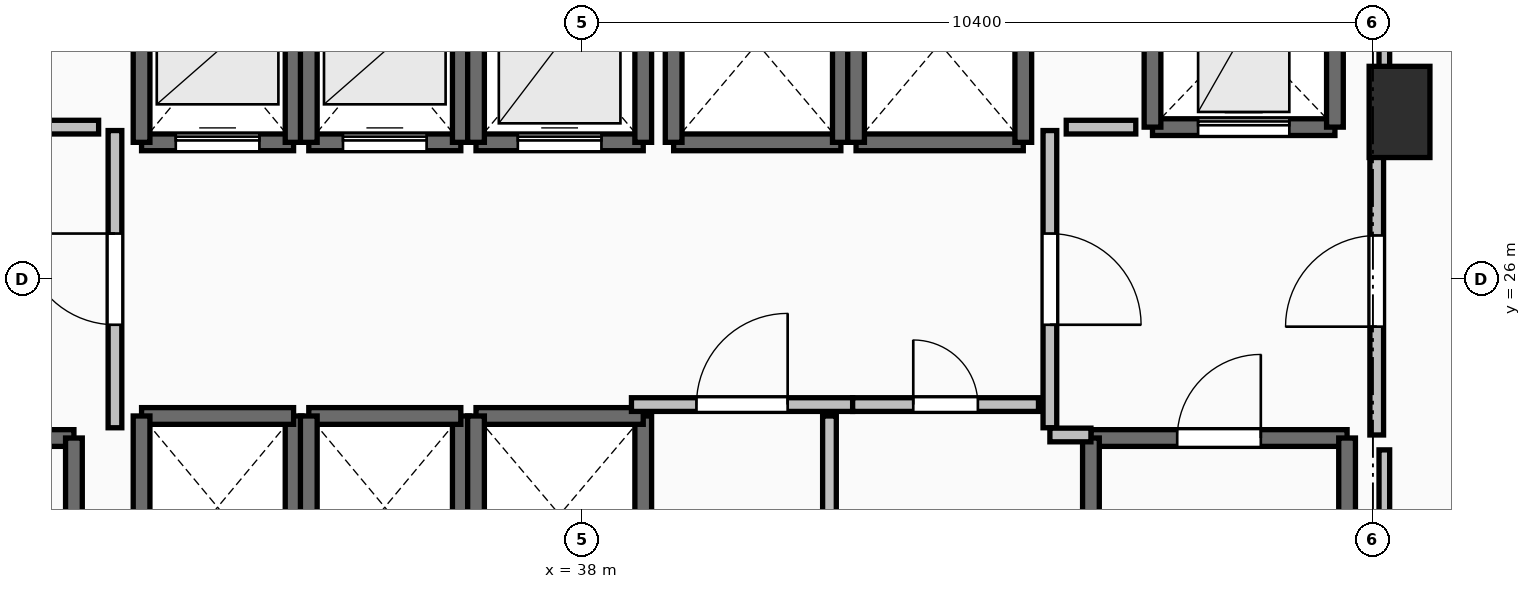
"""IFC4 building model, lengths in metres.
Left out: names, types, materials, properties, quantities, classifications, styles, units other than length and angle.
Written with IfcOpenShell. Run it as: python <this file> out.ifc"""

import sys

from ifc_helpers import new_model, si_unit, direction, frame, frame_2d, origin, origin_2d, place, context, subcontext, project, spatial, rectangle, extrude, element, fill, save


model = new_model("IFC4")
c1 = context("Model", 3, precision=1e-05, world=origin(), true_north=direction((0.0, 1.0)))
c2 = subcontext(c1, "Body", "Model", "MODEL_VIEW")
j1 = project(units=[si_unit("LENGTHUNIT", "METRE"), si_unit("PLANEANGLEUNIT", "RADIAN")], contexts=[c1])
p1 = place(None, origin())
s1 = spatial("IfcSite", under=j1, at=p1, CompositionType="ELEMENT")
p2 = place(p1, origin())
s2 = spatial("IfcBuilding", under=s1, at=p2, CompositionType="ELEMENT")
p3 = place(p2, frame((0.0, 0.0, 110.3)))
s3 = spatial("IfcBuildingStorey", under=s2, at=p3, CompositionType="ELEMENT", Elevation=110.3)
p4 = place(p3, frame((48.75, 28.2, 0.0), z_axis=(0.0, 0.0, 1.0), x_axis=(1.0, 0.0, 0.0)))
e1 = element("IfcColumn", 1, at=p4, inside=s3, PredefinedType="PILASTER", context=c2, shape_type="SweptSolid", body=[
    extrude(rectangle(XDim=0.8, YDim=1.2, at=origin_2d()), origin(), (0.0, 0.0, 1.0), 3.5),
])
p5 = place(p3, frame((27.94, 23.91, 0.0), z_axis=(0.0, 0.0, 1.0), x_axis=(1.0, 0.0, 0.0)))
e2 = element("IfcWall", 2, at=p5, inside=s3, PredefinedType="SOLIDWALL", context=c2, shape_type="SweptSolid", body=[
    extrude(rectangle(XDim=3.37, YDim=0.22, at=frame_2d((1.685, 0.0))), origin(), (0.0, 0.0, 1.0), 3.24),
])
p6 = place(p5, frame((1.135, 0.0, 0.0)))
e3 = element("IfcOpeningElement", 3, at=p6, cuts=e2, PredefinedType="OPENING", context=c2, shape_type="SweptSolid", body=[
    extrude(rectangle(XDim=1.1, YDim=2.15, at=frame_2d((0.55, 1.075))), frame((0.0, 0.125, 0.0), z_axis=(0.0, -1.0, 0.0), x_axis=(1.0, 0.0, 0.0)), (0.0, 0.0, 1.0), 0.25),
])
p7 = place(p3, frame((31.31, 23.91, 0.0), z_axis=(0.0, 0.0, 1.0), x_axis=(0.0, -1.0, 0.0)))
e4 = element("IfcWall", 4, at=p7, inside=s3, PredefinedType="SOLIDWALL", context=c2, shape_type="SweptSolid", body=[
    extrude(rectangle(XDim=7.42, YDim=0.22, at=frame_2d((3.71, 0.0))), origin(), (0.0, 0.0, 1.0), 3.24),
])
p8 = place(p3, frame((44.69, 23.91, 0.0), z_axis=(0.0, 0.0, 1.0), x_axis=(1.0, 0.0, 0.0)))
e5 = element("IfcWall", 5, at=p8, inside=s3, PredefinedType="SOLIDWALL", context=c2, shape_type="SweptSolid", body=[
    extrude(rectangle(XDim=3.37, YDim=0.22, at=frame_2d((1.685, 0.0))), origin(), (0.0, 0.0, 1.0), 3.24),
])
p9 = place(p8, frame((1.135, 0.0, 0.0)))
e6 = element("IfcOpeningElement", 6, at=p9, cuts=e5, PredefinedType="OPENING", context=c2, shape_type="SweptSolid", body=[
    extrude(rectangle(XDim=1.1, YDim=2.15, at=frame_2d((0.55, 1.075))), frame((0.0, 0.125, 0.0), z_axis=(0.0, -1.0, 0.0), x_axis=(1.0, 0.0, 0.0)), (0.0, 0.0, 1.0), 0.25),
])
for number, where, z_axis, x_axis in (
    (7, (48.06, 23.91, 0.0), (0.0, 0.0, 1.0), (0.0, -1.0, 0.0)),
    (8, (44.69, 16.49, 0.0), (0.0, 0.0, 1.0), (0.0, 1.0, 0.0)),
):
    element("IfcWall", number, at=place(p3, frame(where, z_axis=z_axis, x_axis=x_axis)), inside=s3, PredefinedType="SOLIDWALL", context=c2, shape_type="SweptSolid", body=[
        extrude(rectangle(XDim=7.42, YDim=0.22, at=frame_2d((3.71, 0.0))), origin(), (0.0, 0.0, 1.0), 3.24),
    ])
p10 = place(p3, frame((32.2, 27.8, 0.0), z_axis=(0.0, 0.0, 1.0), x_axis=(1.0, 0.0, 0.0)))
e9 = element("IfcWall", 9, at=p10, inside=s3, PredefinedType="SOLIDWALL", context=c2, shape_type="SweptSolid", body=[
    extrude(rectangle(XDim=2.0, YDim=0.22, at=frame_2d((1.0, 0.0))), origin(), (0.0, 0.0, 1.0), 3.24),
])
p11 = place(p10, frame((0.45, 0.0, 0.0)))
e10 = element("IfcOpeningElement", 10, at=p11, cuts=e9, PredefinedType="OPENING", context=c2, shape_type="SweptSolid", body=[
    extrude(rectangle(XDim=1.1, YDim=2.2, at=frame_2d((0.55, 1.1))), frame((0.0, 0.125, 0.0), z_axis=(0.0, -1.0, 0.0), x_axis=(1.0, 0.0, 0.0)), (0.0, 0.0, 1.0), 0.25),
])
for number, where, z_axis, x_axis in (
    (11, (34.2, 27.8, 0.0), (0.0, 0.0, 1.0), (0.0, 1.0, 0.0)),
    (12, (32.2, 30.2, 0.0), (0.0, 0.0, 1.0), (0.0, -1.0, 0.0)),
):
    element("IfcWall", number, at=place(p3, frame(where, z_axis=z_axis, x_axis=x_axis)), inside=s3, PredefinedType="SOLIDWALL", context=c2, shape_type="SweptSolid", body=[
        extrude(rectangle(XDim=2.4, YDim=0.22, at=frame_2d((1.2, 0.0))), origin(), (0.0, 0.0, 1.0), 3.24),
    ])
p12 = place(p3, frame((34.4, 27.8, 0.0), z_axis=(0.0, 0.0, 1.0), x_axis=(1.0, 0.0, 0.0)))
e13 = element("IfcWall", 13, at=p12, inside=s3, PredefinedType="SOLIDWALL", context=c2, shape_type="SweptSolid", body=[
    extrude(rectangle(XDim=2.0, YDim=0.22, at=frame_2d((1.0, 0.0))), origin(), (0.0, 0.0, 1.0), 3.24),
])
p13 = place(p12, frame((0.45, 0.0, 0.0)))
e14 = element("IfcOpeningElement", 14, at=p13, cuts=e13, PredefinedType="OPENING", context=c2, shape_type="SweptSolid", body=[
    extrude(rectangle(XDim=1.1, YDim=2.2, at=frame_2d((0.55, 1.1))), frame((0.0, 0.125, 0.0), z_axis=(0.0, -1.0, 0.0), x_axis=(1.0, 0.0, 0.0)), (0.0, 0.0, 1.0), 0.25),
])
for number, where, z_axis, x_axis in (
    (15, (36.4, 27.8, 0.0), (0.0, 0.0, 1.0), (0.0, 1.0, 0.0)),
    (16, (34.4, 30.2, 0.0), (0.0, 0.0, 1.0), (0.0, -1.0, 0.0)),
):
    element("IfcWall", number, at=place(p3, frame(where, z_axis=z_axis, x_axis=x_axis)), inside=s3, PredefinedType="SOLIDWALL", context=c2, shape_type="SweptSolid", body=[
        extrude(rectangle(XDim=2.4, YDim=0.22, at=frame_2d((1.2, 0.0))), origin(), (0.0, 0.0, 1.0), 3.24),
    ])
p14 = place(p3, frame((36.6, 27.8, 0.0), z_axis=(0.0, 0.0, 1.0), x_axis=(1.0, 0.0, 0.0)))
e17 = element("IfcWall", 17, at=p14, inside=s3, PredefinedType="SOLIDWALL", context=c2, shape_type="SweptSolid", body=[
    extrude(rectangle(XDim=2.2, YDim=0.22, at=frame_2d((1.1, 0.0))), origin(), (0.0, 0.0, 1.0), 3.24),
])
p15 = place(p14, frame((0.55, 0.0, 0.0)))
e18 = element("IfcOpeningElement", 18, at=p15, cuts=e17, PredefinedType="OPENING", context=c2, shape_type="SweptSolid", body=[
    extrude(rectangle(XDim=1.1, YDim=2.2, at=frame_2d((0.55, 1.1))), frame((0.0, 0.125, 0.0), z_axis=(0.0, -1.0, 0.0), x_axis=(1.0, 0.0, 0.0)), (0.0, 0.0, 1.0), 0.25),
])
for number, where, z_axis, x_axis in (
    (19, (38.8, 27.8, 0.0), (0.0, 0.0, 1.0), (0.0, 1.0, 0.0)),
    (20, (36.6, 30.4, 0.0), (0.0, 0.0, 1.0), (0.0, -1.0, 0.0)),
):
    element("IfcWall", number, at=place(p3, frame(where, z_axis=z_axis, x_axis=x_axis)), inside=s3, PredefinedType="SOLIDWALL", context=c2, shape_type="SweptSolid", body=[
        extrude(rectangle(XDim=2.6, YDim=0.22, at=frame_2d((1.3, 0.0))), origin(), (0.0, 0.0, 1.0), 3.24),
    ])
p16 = place(p3, frame((34.2, 21.8, 0.0), z_axis=(0.0, 0.0, 1.0), x_axis=(0.0, 1.0, 0.0)))
e21 = element("IfcWall", 21, at=p16, inside=s3, PredefinedType="SOLIDWALL", context=c2, shape_type="SweptSolid", body=[
    extrude(rectangle(XDim=2.4, YDim=0.22, at=frame_2d((1.2, 0.0))), origin(), (0.0, 0.0, 1.0), 3.24),
])
p17 = place(p3, frame((34.2, 24.2, 0.0), z_axis=(0.0, 0.0, 1.0), x_axis=(-1.0, 0.0, 0.0)))
e22 = element("IfcWall", 22, at=p17, inside=s3, PredefinedType="SOLIDWALL", context=c2, shape_type="SweptSolid", body=[
    extrude(rectangle(XDim=2.0, YDim=0.22, at=frame_2d((1.0, 0.0))), origin(), (0.0, 0.0, 1.0), 3.24),
])
for number, where, z_axis, x_axis in (
    (23, (32.2, 24.2, 0.0), (0.0, 0.0, 1.0), (0.0, -1.0, 0.0)),
    (24, (36.4, 21.8, 0.0), (0.0, 0.0, 1.0), (0.0, 1.0, 0.0)),
):
    element("IfcWall", number, at=place(p3, frame(where, z_axis=z_axis, x_axis=x_axis)), inside=s3, PredefinedType="SOLIDWALL", context=c2, shape_type="SweptSolid", body=[
        extrude(rectangle(XDim=2.4, YDim=0.22, at=frame_2d((1.2, 0.0))), origin(), (0.0, 0.0, 1.0), 3.24),
    ])
p18 = place(p3, frame((36.4, 24.2, 0.0), z_axis=(0.0, 0.0, 1.0), x_axis=(-1.0, 0.0, 0.0)))
e25 = element("IfcWall", 25, at=p18, inside=s3, PredefinedType="SOLIDWALL", context=c2, shape_type="SweptSolid", body=[
    extrude(rectangle(XDim=2.0, YDim=0.22, at=frame_2d((1.0, 0.0))), origin(), (0.0, 0.0, 1.0), 3.24),
])
p19 = place(p3, frame((34.4, 24.2, 0.0), z_axis=(0.0, 0.0, 1.0), x_axis=(0.0, -1.0, 0.0)))
e26 = element("IfcWall", 26, at=p19, inside=s3, PredefinedType="SOLIDWALL", context=c2, shape_type="SweptSolid", body=[
    extrude(rectangle(XDim=2.4, YDim=0.22, at=frame_2d((1.2, 0.0))), origin(), (0.0, 0.0, 1.0), 3.24),
])
p20 = place(p3, frame((38.8, 21.6, 0.0), z_axis=(0.0, 0.0, 1.0), x_axis=(0.0, 1.0, 0.0)))
e27 = element("IfcWall", 27, at=p20, inside=s3, PredefinedType="SOLIDWALL", context=c2, shape_type="SweptSolid", body=[
    extrude(rectangle(XDim=2.6, YDim=0.22, at=frame_2d((1.3, 0.0))), origin(), (0.0, 0.0, 1.0), 3.24),
])
p21 = place(p3, frame((38.8, 24.2, 0.0), z_axis=(0.0, 0.0, 1.0), x_axis=(-1.0, 0.0, 0.0)))
e28 = element("IfcWall", 28, at=p21, inside=s3, PredefinedType="SOLIDWALL", context=c2, shape_type="SweptSolid", body=[
    extrude(rectangle(XDim=2.2, YDim=0.22, at=frame_2d((1.1, 0.0))), origin(), (0.0, 0.0, 1.0), 3.24),
])
p22 = place(p3, frame((36.6, 24.2, 0.0), z_axis=(0.0, 0.0, 1.0), x_axis=(0.0, -1.0, 0.0)))
e29 = element("IfcWall", 29, at=p22, inside=s3, PredefinedType="SOLIDWALL", context=c2, shape_type="SweptSolid", body=[
    extrude(rectangle(XDim=2.6, YDim=0.22, at=frame_2d((1.3, 0.0))), origin(), (0.0, 0.0, 1.0), 3.24),
])
p23 = place(p3, frame((39.2, 27.8, 0.0), z_axis=(0.0, 0.0, 1.0), x_axis=(1.0, 0.0, 0.0)))
e30 = element("IfcWall", 30, at=p23, inside=s3, PredefinedType="SOLIDWALL", context=c2, shape_type="SweptSolid", body=[
    extrude(rectangle(XDim=2.2, YDim=0.22, at=frame_2d((1.1, 0.0))), origin(), (0.0, 0.0, 1.0), 3.24),
])
for number, where, z_axis, x_axis in (
    (31, (41.4, 27.8, 0.0), (0.0, 0.0, 1.0), (0.0, 1.0, 0.0)),
    (32, (39.2, 30.4, 0.0), (0.0, 0.0, 1.0), (0.0, -1.0, 0.0)),
):
    element("IfcWall", number, at=place(p3, frame(where, z_axis=z_axis, x_axis=x_axis)), inside=s3, PredefinedType="SOLIDWALL", context=c2, shape_type="SweptSolid", body=[
        extrude(rectangle(XDim=2.6, YDim=0.22, at=frame_2d((1.3, 0.0))), origin(), (0.0, 0.0, 1.0), 3.24),
    ])
p24 = place(p3, frame((41.6, 27.8, 0.0), z_axis=(0.0, 0.0, 1.0), x_axis=(1.0, 0.0, 0.0)))
e33 = element("IfcWall", 33, at=p24, inside=s3, PredefinedType="SOLIDWALL", context=c2, shape_type="SweptSolid", body=[
    extrude(rectangle(XDim=2.2, YDim=0.22, at=frame_2d((1.1, 0.0))), origin(), (0.0, 0.0, 1.0), 3.24),
])
for number, where, z_axis, x_axis in (
    (34, (43.8, 27.8, 0.0), (0.0, 0.0, 1.0), (0.0, 1.0, 0.0)),
    (35, (41.6, 30.4, 0.0), (0.0, 0.0, 1.0), (0.0, -1.0, 0.0)),
):
    element("IfcWall", number, at=place(p3, frame(where, z_axis=z_axis, x_axis=x_axis)), inside=s3, PredefinedType="SOLIDWALL", context=c2, shape_type="SweptSolid", body=[
        extrude(rectangle(XDim=2.6, YDim=0.22, at=frame_2d((1.3, 0.0))), origin(), (0.0, 0.0, 1.0), 3.24),
    ])
p25 = place(p3, frame((45.5, 28.0, 0.0), z_axis=(0.0, 0.0, 1.0), x_axis=(1.0, 0.0, 0.0)))
e36 = element("IfcWall", 36, at=p25, inside=s3, PredefinedType="SHEAR", context=c2, shape_type="SweptSolid", body=[
    extrude(rectangle(XDim=2.4, YDim=0.22, at=frame_2d((1.2, 0.0))), origin(), (0.0, 0.0, 1.0), 3.24),
])
p26 = place(p25, frame((0.6, 0.0, 0.0)))
e37 = element("IfcOpeningElement", 37, at=p26, cuts=e36, PredefinedType="OPENING", context=c2, shape_type="SweptSolid", body=[
    extrude(rectangle(XDim=1.2, YDim=2.2, at=frame_2d((0.6, 1.1))), frame((0.0, 0.125, 0.0), z_axis=(0.0, -1.0, 0.0), x_axis=(1.0, 0.0, 0.0)), (0.0, 0.0, 1.0), 0.25),
])
for number, where, z_axis, x_axis in (
    (38, (47.9, 28.0, 0.0), (0.0, 0.0, 1.0), (0.0, 1.0, 0.0)),
    (39, (45.5, 30.5, 0.0), (0.0, 0.0, 1.0), (0.0, -1.0, 0.0)),
):
    element("IfcWall", number, at=place(p3, frame(where, z_axis=z_axis, x_axis=x_axis)), inside=s3, PredefinedType="SHEAR", context=c2, shape_type="SweptSolid", body=[
        extrude(rectangle(XDim=2.5, YDim=0.22, at=frame_2d((1.25, 0.0))), origin(), (0.0, 0.0, 1.0), 3.24),
    ])
p27 = place(p3, frame((31.85, 24.045, 0.0), z_axis=(0.0, 0.0, 1.0), x_axis=(0.0, 1.0, 0.0)))
e40 = element("IfcWall", 40, at=p27, inside=s3, PredefinedType="PARTITIONING", context=c2, shape_type="SweptSolid", body=[
    extrude(rectangle(XDim=3.91, YDim=0.18, at=frame_2d((1.955, 0.0))), origin(), (0.0, 0.0, 1.0), 3.24),
])
p28 = place(p27, frame((1.355, 0.0, 0.0)))
e41 = element("IfcOpeningElement", 41, at=p28, cuts=e40, PredefinedType="OPENING", context=c2, shape_type="SweptSolid", body=[
    extrude(rectangle(XDim=1.2, YDim=2.15, at=frame_2d((0.6, 1.075))), frame((0.0, 0.105, 0.0), z_axis=(0.0, -1.0, 0.0), x_axis=(1.0, 0.0, 0.0)), (0.0, 0.0, 1.0), 0.21),
])
p29 = place(p3, frame((44.15, 27.955, 0.0), z_axis=(0.0, 0.0, 1.0), x_axis=(0.0, -1.0, 0.0)))
e42 = element("IfcWall", 42, at=p29, inside=s3, PredefinedType="PARTITIONING", context=c2, shape_type="SweptSolid", body=[
    extrude(rectangle(XDim=3.91, YDim=0.18, at=frame_2d((1.955, 0.0))), origin(), (0.0, 0.0, 1.0), 3.24),
])
p30 = place(p29, frame((1.355, 0.0, 0.0)))
e43 = element("IfcOpeningElement", 43, at=p30, cuts=e42, PredefinedType="OPENING", context=c2, shape_type="SweptSolid", body=[
    extrude(rectangle(XDim=1.2, YDim=2.15, at=frame_2d((0.6, 1.075))), frame((0.0, 0.105, 0.0), z_axis=(0.0, -1.0, 0.0), x_axis=(1.0, 0.0, 0.0)), (0.0, 0.0, 1.0), 0.21),
])
p31 = place(p3, frame((44.15, 23.95, 0.0), z_axis=(0.0, 0.0, 1.0), x_axis=(1.0, 0.0, 0.0)))
e44 = element("IfcWall", 44, at=p31, inside=s3, PredefinedType="PARTITIONING", context=c2, shape_type="SweptSolid", body=[
    extrude(rectangle(XDim=0.54, YDim=0.18, at=frame_2d((0.27, 0.0))), origin(), (0.0, 0.0, 1.0), 3.24),
])
p32 = place(p3, frame((48.45, 23.95, 0.0), z_axis=(0.0, 0.0, 1.0), x_axis=(0.0, 1.0, 0.0)))
e45 = element("IfcWall", 45, at=p32, inside=s3, PredefinedType="PARTITIONING", context=c2, shape_type="SweptSolid", body=[
    extrude(rectangle(XDim=4.05, YDim=0.18, at=frame_2d((2.025, 0.0))), origin(), (0.0, 0.0, 1.0), 3.24),
])
p33 = place(p32, frame((1.425, 0.0, 0.0)))
e46 = element("IfcOpeningElement", 46, at=p33, cuts=e45, PredefinedType="OPENING", context=c2, shape_type="SweptSolid", body=[
    extrude(rectangle(XDim=1.2, YDim=2.15, at=frame_2d((0.6, 1.075))), frame((0.0, 0.105, 0.0), z_axis=(0.0, -1.0, 0.0), x_axis=(1.0, 0.0, 0.0)), (0.0, 0.0, 1.0), 0.21),
])
p34 = place(p3, frame((38.645, 24.35, 0.0), z_axis=(0.0, 0.0, 1.0), x_axis=(1.0, 0.0, 0.0)))
e47 = element("IfcWall", 47, at=p34, inside=s3, PredefinedType="PARTITIONING", context=c2, shape_type="SweptSolid", body=[
    extrude(rectangle(XDim=2.91, YDim=0.18, at=frame_2d((1.455, 0.0))), origin(), (0.0, 0.0, 1.0), 3.24),
])
p35 = place(p34, frame((0.855, 0.0, 0.0)))
e48 = element("IfcOpeningElement", 48, at=p35, cuts=e47, PredefinedType="OPENING", context=c2, shape_type="SweptSolid", body=[
    extrude(rectangle(XDim=1.2, YDim=2.15, at=frame_2d((0.6, 1.075))), frame((0.0, 0.105, 0.0), z_axis=(0.0, -1.0, 0.0), x_axis=(1.0, 0.0, 0.0)), (0.0, 0.0, 1.0), 0.21),
])
p36 = place(p3, frame((41.555, 24.35, 0.0), z_axis=(0.0, 0.0, 1.0), x_axis=(1.0, 0.0, 0.0)))
e49 = element("IfcWall", 49, at=p36, inside=s3, PredefinedType="PARTITIONING", context=c2, shape_type="SweptSolid", body=[
    extrude(rectangle(XDim=2.445, YDim=0.18, at=frame_2d((1.223, 0.0))), origin(), (0.0, 0.0, 1.0), 3.24),
])
p37 = place(p36, frame((0.798, 0.0, 0.0)))
e50 = element("IfcOpeningElement", 50, at=p37, cuts=e49, PredefinedType="OPENING", context=c2, shape_type="SweptSolid", body=[
    extrude(rectangle(XDim=0.85, YDim=2.1, at=frame_2d((0.425, 1.05))), frame((0.0, 0.105, 0.0), z_axis=(0.0, -1.0, 0.0), x_axis=(1.0, 0.0, 0.0)), (0.0, 0.0, 1.0), 0.21),
])
p38 = place(p3, frame((41.25, 20.305, 0.0), z_axis=(0.0, 0.0, 1.0), x_axis=(0.0, 1.0, 0.0)))
e51 = element("IfcWall", 51, at=p38, inside=s3, PredefinedType="PARTITIONING", context=c2, shape_type="SweptSolid", body=[
    extrude(rectangle(XDim=3.895, YDim=0.18, at=frame_2d((1.948, 0.0))), origin(), (0.0, 0.0, 1.0), 3.24),
])
p39 = place(p38, frame((1.522, 0.0, 0.0)))
e52 = element("IfcOpeningElement", 52, at=p39, cuts=e51, PredefinedType="OPENING", context=c2, shape_type="SweptSolid", body=[
    extrude(rectangle(XDim=0.85, YDim=2.1, at=frame_2d((0.425, 1.05))), frame((0.0, 0.105, 0.0), z_axis=(0.0, -1.0, 0.0), x_axis=(1.0, 0.0, 0.0)), (0.0, 0.0, 1.0), 0.21),
])
for number, where, z_axis, x_axis in (
    (53, (31.635, 28.0, 0.0), (0.0, 0.0, 1.0), (-1.0, 0.0, 0.0)),
    (54, (45.28, 28.0, 0.0), (0.0, 0.0, 1.0), (-1.0, 0.0, 0.0)),
):
    element("IfcWall", number, at=place(p3, frame(where, z_axis=z_axis, x_axis=x_axis)), inside=s3, PredefinedType="PARTITIONING", context=c2, shape_type="SweptSolid", body=[
        extrude(rectangle(XDim=0.915, YDim=0.18, at=frame_2d((0.458, 0.0))), origin(), (0.0, 0.0, 1.0), 3.24),
    ])
p40 = place(p3, frame((48.55, 33.45, 0.0), z_axis=(0.0, 0.0, 1.0), x_axis=(0.0, -1.0, 0.0)))
e55 = element("IfcWall", 55, at=p40, inside=s3, PredefinedType="PARTITIONING", context=c2, shape_type="SweptSolid", body=[
    extrude(rectangle(XDim=5.254, YDim=0.14, at=frame_2d((2.627, 0.0))), origin(), (0.0, 0.0, 1.0), 2.432),
])
p41 = place(p3, frame((48.55, 23.754, 0.0), z_axis=(0.0, 0.0, 1.0), x_axis=(0.0, -1.0, 0.0)))
e56 = element("IfcWall", 56, at=p41, inside=s3, PredefinedType="PARTITIONING", context=c2, shape_type="SweptSolid", body=[
    extrude(rectangle(XDim=7.514, YDim=0.14, at=frame_2d((3.757, 0.0))), origin(), (0.0, 0.0, 1.0), 2.432),
])
p42 = place(p9, origin())
e57 = element("IfcDoor", 57, at=p42, inside=s3, OperationType="SINGLE_SWING_RIGHT", PredefinedType="DOOR", context=c2, shape_type="SweptSolid", body=[
    extrude(rectangle(XDim=1.1, YDim=2.15, at=frame_2d((0.55, 1.075))), frame((0.0, 0.025, 0.0), z_axis=(0.0, -1.0, 0.0), x_axis=(1.0, 0.0, 0.0)), (0.0, 0.0, 1.0), 0.05),
])
fill(e6, e57)
p43 = place(p11, origin())
e58 = element("IfcDoor", 58, at=p43, inside=s3, OperationType="SLIDING_TO_LEFT", PredefinedType="DOOR", context=c2, shape_type="SweptSolid", body=[
    extrude(rectangle(XDim=1.1, YDim=2.2, at=frame_2d((0.55, 1.1))), frame((0.0, 0.025, 0.0), z_axis=(0.0, -1.0, 0.0), x_axis=(1.0, 0.0, 0.0)), (0.0, 0.0, 1.0), 0.05),
])
fill(e10, e58)
p44 = place(p13, origin())
e59 = element("IfcDoor", 59, at=p44, inside=s3, OperationType="SLIDING_TO_LEFT", PredefinedType="DOOR", context=c2, shape_type="SweptSolid", body=[
    extrude(rectangle(XDim=1.1, YDim=2.2, at=frame_2d((0.55, 1.1))), frame((0.0, 0.025, 0.0), z_axis=(0.0, -1.0, 0.0), x_axis=(1.0, 0.0, 0.0)), (0.0, 0.0, 1.0), 0.05),
])
fill(e14, e59)
p45 = place(p15, origin())
e60 = element("IfcDoor", 60, at=p45, inside=s3, OperationType="SLIDING_TO_LEFT", PredefinedType="DOOR", context=c2, shape_type="SweptSolid", body=[
    extrude(rectangle(XDim=1.1, YDim=2.2, at=frame_2d((0.55, 1.1))), frame((0.0, 0.025, 0.0), z_axis=(0.0, -1.0, 0.0), x_axis=(1.0, 0.0, 0.0)), (0.0, 0.0, 1.0), 0.05),
])
fill(e18, e60)
p46 = place(p26, origin())
e61 = element("IfcDoor", 61, at=p46, inside=s3, OperationType="SLIDING_TO_LEFT", PredefinedType="DOOR", context=c2, shape_type="SweptSolid", body=[
    extrude(rectangle(XDim=1.2, YDim=2.2, at=frame_2d((0.6, 1.1))), frame((0.0, 0.025, 0.0), z_axis=(0.0, -1.0, 0.0), x_axis=(1.0, 0.0, 0.0)), (0.0, 0.0, 1.0), 0.05),
])
fill(e37, e61)
p47 = place(p28, origin())
e62 = element("IfcDoor", 62, at=p47, inside=s3, OperationType="SINGLE_SWING_RIGHT", PredefinedType="DOOR", context=c2, shape_type="SweptSolid", body=[
    extrude(rectangle(XDim=1.2, YDim=2.15, at=frame_2d((0.6, 1.075))), frame((0.0, 0.025, 0.0), z_axis=(0.0, -1.0, 0.0), x_axis=(1.0, 0.0, 0.0)), (0.0, 0.0, 1.0), 0.05),
])
fill(e41, e62)
p48 = place(p30, origin())
e63 = element("IfcDoor", 63, at=p48, inside=s3, OperationType="SINGLE_SWING_RIGHT", PredefinedType="DOOR", context=c2, shape_type="SweptSolid", body=[
    extrude(rectangle(XDim=1.2, YDim=2.15, at=frame_2d((0.6, 1.075))), frame((0.0, 0.025, 0.0), z_axis=(0.0, -1.0, 0.0), x_axis=(1.0, 0.0, 0.0)), (0.0, 0.0, 1.0), 0.05),
])
fill(e43, e63)
p49 = place(p33, origin())
e64 = element("IfcDoor", 64, at=p49, inside=s3, OperationType="SINGLE_SWING_LEFT", PredefinedType="DOOR", context=c2, shape_type="SweptSolid", body=[
    extrude(rectangle(XDim=1.2, YDim=2.15, at=frame_2d((0.6, 1.075))), frame((0.0, 0.025, 0.0), z_axis=(0.0, -1.0, 0.0), x_axis=(1.0, 0.0, 0.0)), (0.0, 0.0, 1.0), 0.05),
])
fill(e46, e64)
p50 = place(p35, origin())
e65 = element("IfcDoor", 65, at=p50, inside=s3, OperationType="SINGLE_SWING_RIGHT", PredefinedType="DOOR", context=c2, shape_type="SweptSolid", body=[
    extrude(rectangle(XDim=1.2, YDim=2.15, at=frame_2d((0.6, 1.075))), frame((0.0, 0.025, 0.0), z_axis=(0.0, -1.0, 0.0), x_axis=(1.0, 0.0, 0.0)), (0.0, 0.0, 1.0), 0.05),
])
fill(e48, e65)
p51 = place(p37, origin())
e66 = element("IfcDoor", 66, at=p51, inside=s3, OperationType="SINGLE_SWING_LEFT", PredefinedType="DOOR", context=c2, shape_type="SweptSolid", body=[
    extrude(rectangle(XDim=0.85, YDim=2.1, at=frame_2d((0.425, 1.05))), frame((0.0, 0.025, 0.0), z_axis=(0.0, -1.0, 0.0), x_axis=(1.0, 0.0, 0.0)), (0.0, 0.0, 1.0), 0.05),
])
fill(e50, e66)
save(model, sys.argv[1])
